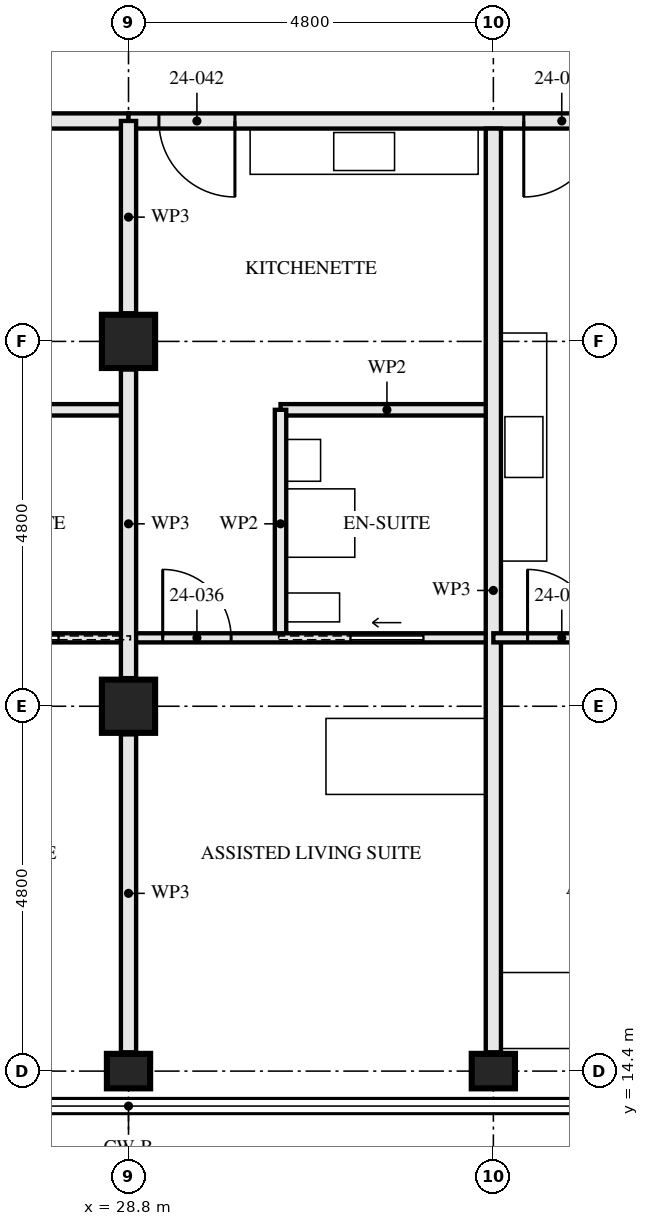
"""IFC4 building model, lengths in metres.
Left out: names, types, materials, properties, quantities, classifications, styles, units other than length and angle.
Written with IfcOpenShell. Run it as: python <this file> out.ifc"""

import sys

from ifc_helpers import new_model, si_unit, direction, frame, frame_2d, origin, origin_2d, place, context, subcontext, project, spatial, rectangle, hollow_rectangle, i_section, extrude, element, fill, save


model = new_model("IFC4")
c1 = context("Model", 3, precision=1e-05, world=origin(), true_north=direction((0.0, 1.0)))
c2 = subcontext(c1, "Body", "Model", "MODEL_VIEW")
j1 = project(units=[si_unit("LENGTHUNIT", "METRE"), si_unit("PLANEANGLEUNIT", "RADIAN")], contexts=[c1])
p1 = place(None, origin())
s1 = spatial("IfcSite", under=j1, at=p1, CompositionType="ELEMENT")
p2 = place(p1, origin())
s2 = spatial("IfcBuilding", under=s1, at=p2, CompositionType="ELEMENT")
p3 = place(p2, frame((0.0, 0.0, 91.0)))
s3 = spatial("IfcBuildingStorey", under=s2, at=p3, CompositionType="ELEMENT", Elevation=91.0)
p4 = place(p3, frame((28.8, 14.4, 0.0), z_axis=(0.0, 0.0, 1.0), x_axis=(0.0, 1.0, 0.0)))
e1 = element("IfcColumn", 1, at=p4, inside=s3, PredefinedType="COLUMN", context=c2, shape_type="SweptSolid", body=[
    extrude(i_section(OverallWidth=0.454, OverallDepth=0.569, WebThickness=0.078, FlangeThickness=0.125, FilletRadius=0.015, at=origin_2d()), origin(), (0.0, 0.0, 1.0), 3.5),
])
for number, where, z_axis, x_axis in (
    (2, (28.8, 19.2, 0.0), (0.0, 0.0, 1.0), (1.0, 0.0, 0.0)),
    (3, (28.8, 24.0, 0.0), (0.0, 0.0, 1.0), (1.0, 0.0, 0.0)),
):
    element("IfcColumn", number, at=place(p3, frame(where, z_axis=z_axis, x_axis=x_axis)), inside=s3, PredefinedType="COLUMN", context=c2, shape_type="SweptSolid", body=[
        extrude(hollow_rectangle(XDim=0.7, YDim=0.7, WallThickness=0.06, at=origin_2d()), origin(), (0.0, 0.0, 1.0), 3.5),
    ])
p5 = place(p3, frame((33.6, 14.4, 0.0), z_axis=(0.0, 0.0, 1.0), x_axis=(0.0, 1.0, 0.0)))
e4 = element("IfcColumn", 4, at=p5, inside=s3, PredefinedType="COLUMN", context=c2, shape_type="SweptSolid", body=[
    extrude(i_section(OverallWidth=0.454, OverallDepth=0.569, WebThickness=0.078, FlangeThickness=0.125, FilletRadius=0.015, at=origin_2d()), origin(), (0.0, 0.0, 1.0), 3.5),
])
p6 = place(p3, frame((26.0, 23.1, 0.0), z_axis=(0.0, 0.0, 1.0), x_axis=(1.0, 0.0, 0.0)))
e5 = element("IfcWall", 5, at=p6, inside=s3, PredefinedType="PARTITIONING", context=c2, shape_type="SweptSolid", body=[
    extrude(rectangle(XDim=2.8, YDim=0.15, at=frame_2d((1.4, 0.0))), origin(), (0.0, 0.0, 1.0), 3.33),
])
p7 = place(p3, frame((24.0, 20.1, 0.0), z_axis=(0.0, 0.0, 1.0), x_axis=(1.0, 0.0, 0.0)))
e6 = element("IfcWall", 6, at=p7, inside=s3, PredefinedType="PARTITIONING", context=c2, shape_type="SweptSolid", body=[
    extrude(rectangle(XDim=4.8, YDim=0.12, at=frame_2d((2.4, 0.0))), origin(), (0.0, 0.0, 1.0), 3.33),
])
p8 = place(p7, frame((0.45, 0.0, 0.0)))
e7 = element("IfcOpeningElement", 7, at=p8, cuts=e6, PredefinedType="OPENING", context=c2, shape_type="SweptSolid", body=[
    extrude(rectangle(XDim=0.9, YDim=2.1, at=frame_2d((0.45, 1.05))), frame((0.0, 0.071, 0.0), z_axis=(0.0, -1.0, 0.0), x_axis=(1.0, 0.0, 0.0)), (0.0, 0.0, 1.0), 0.141),
])
p9 = place(p7, frame((2.925, 0.0, 0.0)))
e8 = element("IfcOpeningElement", 8, at=p9, cuts=e6, PredefinedType="OPENING", context=c2, shape_type="SweptSolid", body=[
    extrude(rectangle(XDim=0.95, YDim=2.1, at=frame_2d((0.475, 1.05))), frame((0.0, 0.071, 0.0), z_axis=(0.0, -1.0, 0.0), x_axis=(1.0, 0.0, 0.0)), (0.0, 0.0, 1.0), 0.141),
])
p10 = place(p3, frame((13.96, 26.9, 0.0), z_axis=(0.0, 0.0, 1.0), x_axis=(1.0, 0.0, 0.0)))
e9 = element("IfcWall", 9, at=p10, inside=s3, PredefinedType="PARTITIONING", context=c2, shape_type="SweptSolid", body=[
    extrude(rectangle(XDim=14.84, YDim=0.2, at=frame_2d((7.42, 0.0))), origin(), (0.0, 0.0, 1.0), 2.32),
])
p11 = place(p10, frame((1.84, 0.0, 0.0)))
e10 = element("IfcOpeningElement", 10, at=p11, cuts=e9, PredefinedType="OPENING", context=c2, shape_type="SweptSolid", body=[
    extrude(rectangle(XDim=1.0, YDim=2.1, at=frame_2d((0.5, 1.05))), frame((0.0, 0.111, 0.0), z_axis=(0.0, -1.0, 0.0), x_axis=(1.0, 0.0, 0.0)), (0.0, 0.0, 1.0), 0.221),
])
p12 = place(p10, frame((4.09, 0.0, 0.0)))
e11 = element("IfcOpeningElement", 11, at=p12, cuts=e9, PredefinedType="OPENING", context=c2, shape_type="SweptSolid", body=[
    extrude(rectangle(XDim=0.9, YDim=2.1, at=frame_2d((0.45, 1.05))), frame((0.0, 0.111, 0.0), z_axis=(0.0, -1.0, 0.0), x_axis=(1.0, 0.0, 0.0)), (0.0, 0.0, 1.0), 0.221),
])
p13 = place(p10, frame((5.64, 0.0, 0.0)))
e12 = element("IfcOpeningElement", 12, at=p13, cuts=e9, PredefinedType="OPENING", context=c2, shape_type="SweptSolid", body=[
    extrude(rectangle(XDim=1.0, YDim=2.1, at=frame_2d((0.5, 1.05))), frame((0.0, 0.111, 0.0), z_axis=(0.0, -1.0, 0.0), x_axis=(1.0, 0.0, 0.0)), (0.0, 0.0, 1.0), 0.221),
])
p14 = place(p10, frame((10.44, 0.0, 0.0)))
e13 = element("IfcOpeningElement", 13, at=p14, cuts=e9, PredefinedType="OPENING", context=c2, shape_type="SweptSolid", body=[
    extrude(rectangle(XDim=1.0, YDim=2.1, at=frame_2d((0.5, 1.05))), frame((0.0, 0.111, 0.0), z_axis=(0.0, -1.0, 0.0), x_axis=(1.0, 0.0, 0.0)), (0.0, 0.0, 1.0), 0.221),
])
p15 = place(p3, frame((30.8, 20.1, 0.0), z_axis=(0.0, 0.0, 1.0), x_axis=(0.0, 1.0, 0.0)))
e14 = element("IfcWall", 14, at=p15, inside=s3, PredefinedType="PARTITIONING", context=c2, shape_type="SweptSolid", body=[
    extrude(rectangle(XDim=3.0, YDim=0.15, at=frame_2d((1.5, 0.0))), origin(), (0.0, 0.0, 1.0), 3.33),
])
p16 = place(p3, frame((30.8, 23.1, 0.0), z_axis=(0.0, 0.0, 1.0), x_axis=(1.0, 0.0, 0.0)))
e15 = element("IfcWall", 15, at=p16, inside=s3, PredefinedType="PARTITIONING", context=c2, shape_type="SweptSolid", body=[
    extrude(rectangle(XDim=2.8, YDim=0.15, at=frame_2d((1.4, 0.0))), origin(), (0.0, 0.0, 1.0), 3.33),
])
p17 = place(p3, frame((28.8, 20.1, 0.0), z_axis=(0.0, 0.0, 1.0), x_axis=(1.0, 0.0, 0.0)))
e16 = element("IfcWall", 16, at=p17, inside=s3, PredefinedType="PARTITIONING", context=c2, shape_type="SweptSolid", body=[
    extrude(rectangle(XDim=4.8, YDim=0.12, at=frame_2d((2.4, 0.0))), origin(), (0.0, 0.0, 1.0), 3.33),
])
p18 = place(p17, frame((0.45, 0.0, 0.0)))
e17 = element("IfcOpeningElement", 17, at=p18, cuts=e16, PredefinedType="OPENING", context=c2, shape_type="SweptSolid", body=[
    extrude(rectangle(XDim=0.9, YDim=2.1, at=frame_2d((0.45, 1.05))), frame((0.0, 0.071, 0.0), z_axis=(0.0, -1.0, 0.0), x_axis=(1.0, 0.0, 0.0)), (0.0, 0.0, 1.0), 0.141),
])
p19 = place(p17, frame((2.925, 0.0, 0.0)))
e18 = element("IfcOpeningElement", 18, at=p19, cuts=e16, PredefinedType="OPENING", context=c2, shape_type="SweptSolid", body=[
    extrude(rectangle(XDim=0.95, YDim=2.1, at=frame_2d((0.475, 1.05))), frame((0.0, 0.071, 0.0), z_axis=(0.0, -1.0, 0.0), x_axis=(1.0, 0.0, 0.0)), (0.0, 0.0, 1.0), 0.141),
])
p20 = place(p3, frame((33.6, 14.647, 0.0), z_axis=(0.0, 0.0, 1.0), x_axis=(0.0, 1.0, 0.0)))
e19 = element("IfcWall", 19, at=p20, inside=s3, PredefinedType="PARTITIONING", context=c2, shape_type="SweptSolid", body=[
    extrude(rectangle(XDim=12.153, YDim=0.2, at=frame_2d((6.077, 0.0))), origin(), (0.0, 0.0, 1.0), 2.55),
])
p21 = place(p3, frame((33.6, 20.1, 0.0), z_axis=(0.0, 0.0, 1.0), x_axis=(1.0, 0.0, 0.0)))
e20 = element("IfcWall", 20, at=p21, inside=s3, PredefinedType="PARTITIONING", context=c2, shape_type="SweptSolid", body=[
    extrude(rectangle(XDim=4.8, YDim=0.12, at=frame_2d((2.4, 0.0))), origin(), (0.0, 0.0, 1.0), 3.33),
])
p22 = place(p21, frame((0.45, 0.0, 0.0)))
e21 = element("IfcOpeningElement", 21, at=p22, cuts=e20, PredefinedType="OPENING", context=c2, shape_type="SweptSolid", body=[
    extrude(rectangle(XDim=0.9, YDim=2.1, at=frame_2d((0.45, 1.05))), frame((0.0, 0.071, 0.0), z_axis=(0.0, -1.0, 0.0), x_axis=(1.0, 0.0, 0.0)), (0.0, 0.0, 1.0), 0.141),
])
p23 = place(p21, frame((2.925, 0.0, 0.0)))
e22 = element("IfcOpeningElement", 22, at=p23, cuts=e20, PredefinedType="OPENING", context=c2, shape_type="SweptSolid", body=[
    extrude(rectangle(XDim=0.95, YDim=2.1, at=frame_2d((0.475, 1.05))), frame((0.0, 0.071, 0.0), z_axis=(0.0, -1.0, 0.0), x_axis=(1.0, 0.0, 0.0)), (0.0, 0.0, 1.0), 0.141),
])
p24 = place(p3, frame((28.8, 26.9, 0.0), z_axis=(0.0, 0.0, 1.0), x_axis=(1.0, 0.0, 0.0)))
e23 = element("IfcWall", 23, at=p24, inside=s3, PredefinedType="PARTITIONING", context=c2, shape_type="SweptSolid", body=[
    extrude(rectangle(XDim=9.6, YDim=0.2, at=frame_2d((4.8, 0.0))), origin(), (0.0, 0.0, 1.0), 3.33),
])
p25 = place(p24, frame((0.4, 0.0, 0.0)))
e24 = element("IfcOpeningElement", 24, at=p25, cuts=e23, PredefinedType="OPENING", context=c2, shape_type="SweptSolid", body=[
    extrude(rectangle(XDim=1.0, YDim=2.1, at=frame_2d((0.5, 1.05))), frame((0.0, 0.111, 0.0), z_axis=(0.0, -1.0, 0.0), x_axis=(1.0, 0.0, 0.0)), (0.0, 0.0, 1.0), 0.221),
])
p26 = place(p24, frame((5.2, 0.0, 0.0)))
e25 = element("IfcOpeningElement", 25, at=p26, cuts=e23, PredefinedType="OPENING", context=c2, shape_type="SweptSolid", body=[
    extrude(rectangle(XDim=1.0, YDim=2.1, at=frame_2d((0.5, 1.05))), frame((0.0, 0.111, 0.0), z_axis=(0.0, -1.0, 0.0), x_axis=(1.0, 0.0, 0.0)), (0.0, 0.0, 1.0), 0.221),
])
p27 = place(p3, frame((28.8, 14.647, 0.0), z_axis=(0.0, 0.0, 1.0), x_axis=(0.0, 1.0, 0.0)))
e26 = element("IfcWall", 26, at=p27, inside=s3, PredefinedType="PARTITIONING", context=c2, shape_type="SweptSolid", body=[
    extrude(rectangle(XDim=4.183, YDim=0.2, at=frame_2d((2.092, 0.0))), origin(), (0.0, 0.0, 1.0), 2.32),
])
p28 = place(p3, frame((28.8, 19.57, 0.0), z_axis=(0.0, 0.0, 1.0), x_axis=(0.0, 1.0, 0.0)))
e27 = element("IfcWall", 27, at=p28, inside=s3, PredefinedType="PARTITIONING", context=c2, shape_type="SweptSolid", body=[
    extrude(rectangle(XDim=4.06, YDim=0.2, at=frame_2d((2.03, 0.0))), origin(), (0.0, 0.0, 1.0), 2.32),
])
p29 = place(p3, frame((28.8, 24.37, 0.0), z_axis=(0.0, 0.0, 1.0), x_axis=(0.0, 1.0, 0.0)))
e28 = element("IfcWall", 28, at=p29, inside=s3, PredefinedType="PARTITIONING", context=c2, shape_type="SweptSolid", body=[
    extrude(rectangle(XDim=2.53, YDim=0.2, at=frame_2d((1.265, 0.0))), origin(), (0.0, 0.0, 1.0), 2.32),
])
p30 = place(p9, origin())
e29 = element("IfcDoor", 29, at=p30, inside=s3, OperationType="SLIDING_TO_LEFT", PredefinedType="DOOR", context=c2, shape_type="SweptSolid", body=[
    extrude(rectangle(XDim=0.95, YDim=2.1, at=frame_2d((0.475, 1.05))), frame((0.0, 0.022, 0.0), z_axis=(0.0, -1.0, 0.0), x_axis=(1.0, 0.0, 0.0)), (0.0, 0.0, 1.0), 0.044),
])
fill(e8, e29)
p31 = place(p18, origin())
e30 = element("IfcDoor", 30, at=p31, inside=s3, OperationType="SINGLE_SWING_RIGHT", PredefinedType="DOOR", context=c2, shape_type="SweptSolid", body=[
    extrude(rectangle(XDim=0.9, YDim=2.1, at=frame_2d((0.45, 1.05))), frame((0.0, 0.022, 0.0), z_axis=(0.0, -1.0, 0.0), x_axis=(1.0, 0.0, 0.0)), (0.0, 0.0, 1.0), 0.044),
])
fill(e17, e30)
p32 = place(p19, origin())
e31 = element("IfcDoor", 31, at=p32, inside=s3, OperationType="SLIDING_TO_RIGHT", PredefinedType="DOOR", context=c2, shape_type="SweptSolid", body=[
    extrude(rectangle(XDim=0.95, YDim=2.1, at=frame_2d((0.475, 1.05))), frame((0.0, 0.022, 0.0), z_axis=(0.0, -1.0, 0.0), x_axis=(1.0, 0.0, 0.0)), (0.0, 0.0, 1.0), 0.044),
])
fill(e18, e31)
p33 = place(p22, origin())
e32 = element("IfcDoor", 32, at=p33, inside=s3, OperationType="SINGLE_SWING_RIGHT", PredefinedType="DOOR", context=c2, shape_type="SweptSolid", body=[
    extrude(rectangle(XDim=0.9, YDim=2.1, at=frame_2d((0.45, 1.05))), frame((0.0, 0.022, 0.0), z_axis=(0.0, -1.0, 0.0), x_axis=(1.0, 0.0, 0.0)), (0.0, 0.0, 1.0), 0.044),
])
fill(e21, e32)
p34 = place(p25, frame((1.0, 0.0, 0.0), z_axis=(0.0, 0.0, 1.0), x_axis=(-1.0, 0.0, 0.0)))
e33 = element("IfcDoor", 33, at=p34, inside=s3, OperationType="SINGLE_SWING_RIGHT", PredefinedType="DOOR", context=c2, shape_type="SweptSolid", body=[
    extrude(rectangle(XDim=1.0, YDim=2.1, at=frame_2d((0.5, 1.05))), frame((0.0, 0.027, 0.0), z_axis=(0.0, -1.0, 0.0), x_axis=(1.0, 0.0, 0.0)), (0.0, 0.0, 1.0), 0.054),
])
fill(e24, e33)
p35 = place(p26, frame((1.0, 0.0, 0.0), z_axis=(0.0, 0.0, 1.0), x_axis=(-1.0, 0.0, 0.0)))
e34 = element("IfcDoor", 34, at=p35, inside=s3, OperationType="SINGLE_SWING_LEFT", PredefinedType="DOOR", context=c2, shape_type="SweptSolid", body=[
    extrude(rectangle(XDim=1.0, YDim=2.1, at=frame_2d((0.5, 1.05))), frame((0.0, 0.027, 0.0), z_axis=(0.0, -1.0, 0.0), x_axis=(1.0, 0.0, 0.0)), (0.0, 0.0, 1.0), 0.054),
])
fill(e25, e34)
save(model, sys.argv[1])
